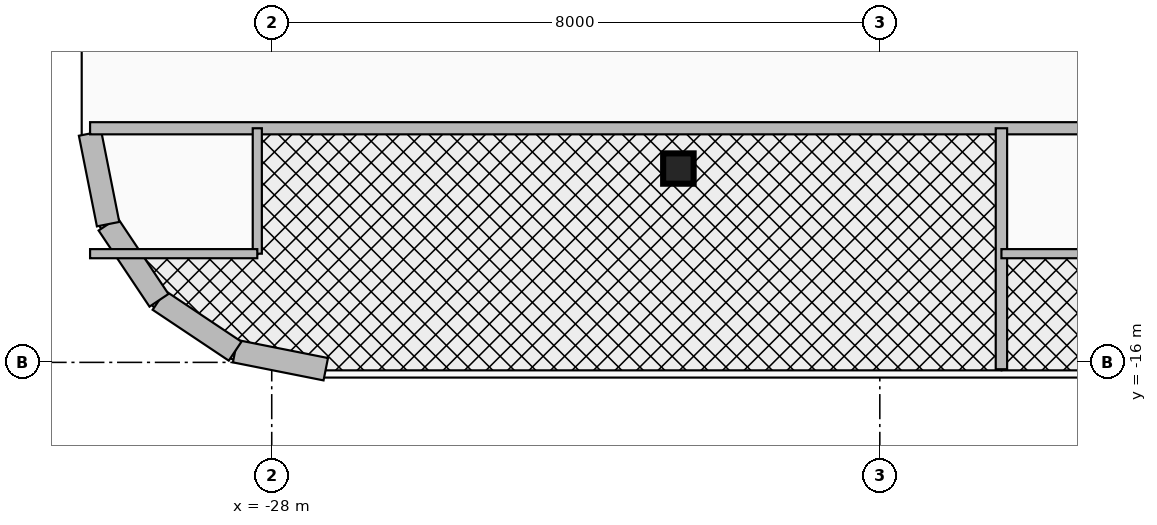
"""IFC4 building model, lengths in metres.
Left out: names, types, materials, properties, quantities, classifications, styles, units other than length and angle.
Written with IfcOpenShell. Run it as: python <this file> out.ifc"""

import sys

from ifc_helpers import new_model, si_unit, direction, frame, frame_2d, origin, origin_2d, place, context, subcontext, project, spatial, rectangle, i_section, extrude, source, transform, mapped, element, fill, save


model = new_model("IFC4")
c1 = context("Model", 3, precision=1e-05, world=origin(), true_north=direction((0.0, 1.0)))
c2 = subcontext(c1, "Body", "Model", "MODEL_VIEW")
j1 = project(units=[si_unit("LENGTHUNIT", "METRE"), si_unit("PLANEANGLEUNIT", "RADIAN")], contexts=[c1])
p1 = place(None, origin())
s1 = spatial("IfcSite", under=j1, at=p1, CompositionType="ELEMENT")
p2 = place(p1, origin())
s2 = spatial("IfcBuilding", under=s1, at=p2, CompositionType="ELEMENT")
p3 = place(p2, frame((0.0, 0.0, 240.5)))
s3 = spatial("IfcBuildingStorey", under=s2, at=p3, CompositionType="ELEMENT", Elevation=240.5)
m1 = source(origin(), c2, "Body", "SweptSolid", [
    extrude(i_section(OverallWidth=0.401, OverallDepth=0.399, WebThickness=0.025, FlangeThickness=0.04, at=origin_2d()), origin(), (0.0, 0.0, 1.0), 3.5),
])
p4 = place(p3, frame((-22.65, -13.45, 0.0), z_axis=(0.0, 0.0, 1.0), x_axis=(1.0, 0.0, 0.0)))
e1 = element("IfcColumn", 1, at=p4, inside=s3, PredefinedType="COLUMN", context=c2, shape_type="MappedRepresentation", body=[
    mapped(m1, transform((0.0, 0.0, 0.0), x_axis=(1.0, 0.0, 0.0), y_axis=(0.0, 1.0, 0.0), z_axis=(0.0, 0.0, 1.0), scale=1.0)),
])
p5 = place(p3, frame((-27.289, -16.09, 0.0), z_axis=(0.0, 0.0, 1.0), x_axis=(-0.980765602568, 0.195189223115, 0.0)))
e2 = element("IfcWall", 2, at=p5, inside=s3, PredefinedType="SOLIDWALL", context=c2, shape_type="SweptSolid", body=[
    extrude(rectangle(XDim=1.216, YDim=0.3, at=frame_2d((0.608, 0.0))), origin(), (0.0, 0.0, 1.0), 3.26),
])
for number, where, z_axis, x_axis in (
    (3, (-28.482, -15.853, 0.0), (0.0, 0.0, 1.0), (-0.831, 0.556, 0.0)),
    (4, (-29.483, -15.183, 0.0), (0.0, 0.0, 1.0), (-0.556, 0.831, 0.0)),
):
    element("IfcWall", number, at=place(p3, frame(where, z_axis=z_axis, x_axis=x_axis)), inside=s3, PredefinedType="SOLIDWALL", context=c2, shape_type="SweptSolid", body=[
        extrude(rectangle(XDim=1.205, YDim=0.3, at=frame_2d((0.603, 0.0))), origin(), (0.0, 0.0, 1.0), 3.26),
    ])
p6 = place(p3, frame((-30.153, -14.182, 0.0), z_axis=(0.0, 0.0, 1.0), x_axis=(-0.194996050505, 0.980804027463, 0.0)))
e5 = element("IfcWall", 5, at=p6, inside=s3, PredefinedType="SOLIDWALL", context=c2, shape_type="SweptSolid", body=[
    extrude(rectangle(XDim=1.216, YDim=0.3, at=frame_2d((0.608, 0.0))), origin(), (0.0, 0.0, 1.0), 3.26),
])
p7 = place(p3, frame((-30.39, -12.92, 0.0), z_axis=(0.0, 0.0, 1.0), x_axis=(1.0, 0.0, 0.0)))
e6 = element("IfcWall", 6, at=p7, inside=s3, PredefinedType="PARTITIONING", context=c2, shape_type="SweptSolid", body=[
    extrude(rectangle(XDim=20.78, YDim=0.16, at=frame_2d((10.39, 0.0))), origin(), (0.0, 0.0, 1.0), 2.634),
])
p8 = place(p7, frame((6.5, 0.0, 0.0)))
e7 = element("IfcOpeningElement", 7, at=p8, cuts=e6, PredefinedType="OPENING", context=c2, shape_type="SweptSolid", body=[
    extrude(rectangle(XDim=0.95, YDim=2.15, at=frame_2d((0.475, 1.075))), frame((0.0, 0.095, 0.0), z_axis=(0.0, -1.0, 0.0), x_axis=(1.0, 0.0, 0.0)), (0.0, 0.0, 1.0), 0.19),
])
p9 = place(p7, frame((16.73, 0.0, 0.0)))
e8 = element("IfcOpeningElement", 8, at=p9, cuts=e6, PredefinedType="OPENING", context=c2, shape_type="SweptSolid", body=[
    extrude(rectangle(XDim=0.95, YDim=2.15, at=frame_2d((0.475, 1.075))), frame((0.0, 0.095, 0.0), z_axis=(0.0, -1.0, 0.0), x_axis=(1.0, 0.0, 0.0)), (0.0, 0.0, 1.0), 0.19),
])
p10 = place(p3, frame((-18.4, -16.09, 0.0), z_axis=(0.0, 0.0, 1.0), x_axis=(0.0, 1.0, 0.0)))
e9 = element("IfcWall", 9, at=p10, inside=s3, PredefinedType="PARTITIONING", context=c2, shape_type="SweptSolid", body=[
    extrude(rectangle(XDim=3.17, YDim=0.15, at=frame_2d((1.585, 0.0))), origin(), (0.0, 0.0, 1.0), 2.706),
])
p11 = place(p3, frame((-28.19, -14.57, 0.0), z_axis=(0.0, 0.0, 1.0), x_axis=(0.0, 1.0, 0.0)))
e10 = element("IfcWall", 10, at=p11, inside=s3, PredefinedType="PARTITIONING", context=c2, shape_type="SweptSolid", body=[
    extrude(rectangle(XDim=1.65, YDim=0.12, at=frame_2d((0.825, 0.0))), origin(), (0.0, 0.0, 1.0), 3.26),
])
p12 = place(p3, frame((-30.39, -14.57, 0.0), z_axis=(0.0, 0.0, 1.0), x_axis=(1.0, 0.0, 0.0)))
e11 = element("IfcWall", 11, at=p12, inside=s3, PredefinedType="PARTITIONING", context=c2, shape_type="SweptSolid", body=[
    extrude(rectangle(XDim=2.2, YDim=0.12, at=frame_2d((1.1, 0.0))), origin(), (0.0, 0.0, 1.0), 3.26),
])
p13 = place(p12, frame((0.94, 0.0, 0.0)))
e12 = element("IfcOpeningElement", 12, at=p13, cuts=e11, PredefinedType="OPENING", context=c2, shape_type="SweptSolid", body=[
    extrude(rectangle(XDim=0.85, YDim=2.1, at=frame_2d((0.425, 1.05))), frame((0.0, 0.075, 0.0), z_axis=(0.0, -1.0, 0.0), x_axis=(1.0, 0.0, 0.0)), (0.0, 0.0, 1.0), 0.15),
])
p14 = place(p3, frame((-18.4, -14.57, 0.0), z_axis=(0.0, 0.0, 1.0), x_axis=(1.0, 0.0, 0.0)))
e13 = element("IfcWall", 13, at=p14, inside=s3, PredefinedType="PARTITIONING", context=c2, shape_type="SweptSolid", body=[
    extrude(rectangle(XDim=2.2, YDim=0.12, at=frame_2d((1.1, 0.0))), origin(), (0.0, 0.0, 1.0), 3.26),
])
p15 = place(p14, frame((0.675, 0.0, 0.0)))
e14 = element("IfcOpeningElement", 14, at=p15, cuts=e13, PredefinedType="OPENING", context=c2, shape_type="SweptSolid", body=[
    extrude(rectangle(XDim=0.85, YDim=2.1, at=frame_2d((0.425, 1.05))), frame((0.0, 0.075, 0.0), z_axis=(0.0, -1.0, 0.0), x_axis=(1.0, 0.0, 0.0)), (0.0, 0.0, 1.0), 0.15),
])
p16 = place(p8, frame((0.95, 0.0, 0.0), z_axis=(0.0, 0.0, 1.0), x_axis=(-1.0, 0.0, 0.0)))
e15 = element("IfcDoor", 15, at=p16, inside=s3, OperationType="SINGLE_SWING_LEFT", PredefinedType="DOOR", context=c2, shape_type="SweptSolid", body=[
    extrude(rectangle(XDim=0.95, YDim=2.15, at=frame_2d((0.475, 1.075))), frame((0.0, 0.025, 0.0), z_axis=(0.0, -1.0, 0.0), x_axis=(1.0, 0.0, 0.0)), (0.0, 0.0, 1.0), 0.05),
])
fill(e7, e15)
p17 = place(p13, origin())
e16 = element("IfcDoor", 16, at=p17, inside=s3, OperationType="SINGLE_SWING_RIGHT", PredefinedType="DOOR", context=c2, shape_type="SweptSolid", body=[
    extrude(rectangle(XDim=0.85, YDim=2.1, at=frame_2d((0.425, 1.05))), frame((0.0, 0.025, 0.0), z_axis=(0.0, -1.0, 0.0), x_axis=(1.0, 0.0, 0.0)), (0.0, 0.0, 1.0), 0.05),
])
fill(e12, e16)
p18 = place(p15, origin())
e17 = element("IfcDoor", 17, at=p18, inside=s3, OperationType="SINGLE_SWING_RIGHT", PredefinedType="DOOR", context=c2, shape_type="SweptSolid", body=[
    extrude(rectangle(XDim=0.85, YDim=2.1, at=frame_2d((0.425, 1.05))), frame((0.0, 0.025, 0.0), z_axis=(0.0, -1.0, 0.0), x_axis=(1.0, 0.0, 0.0)), (0.0, 0.0, 1.0), 0.05),
])
fill(e14, e17)
save(model, sys.argv[1])
